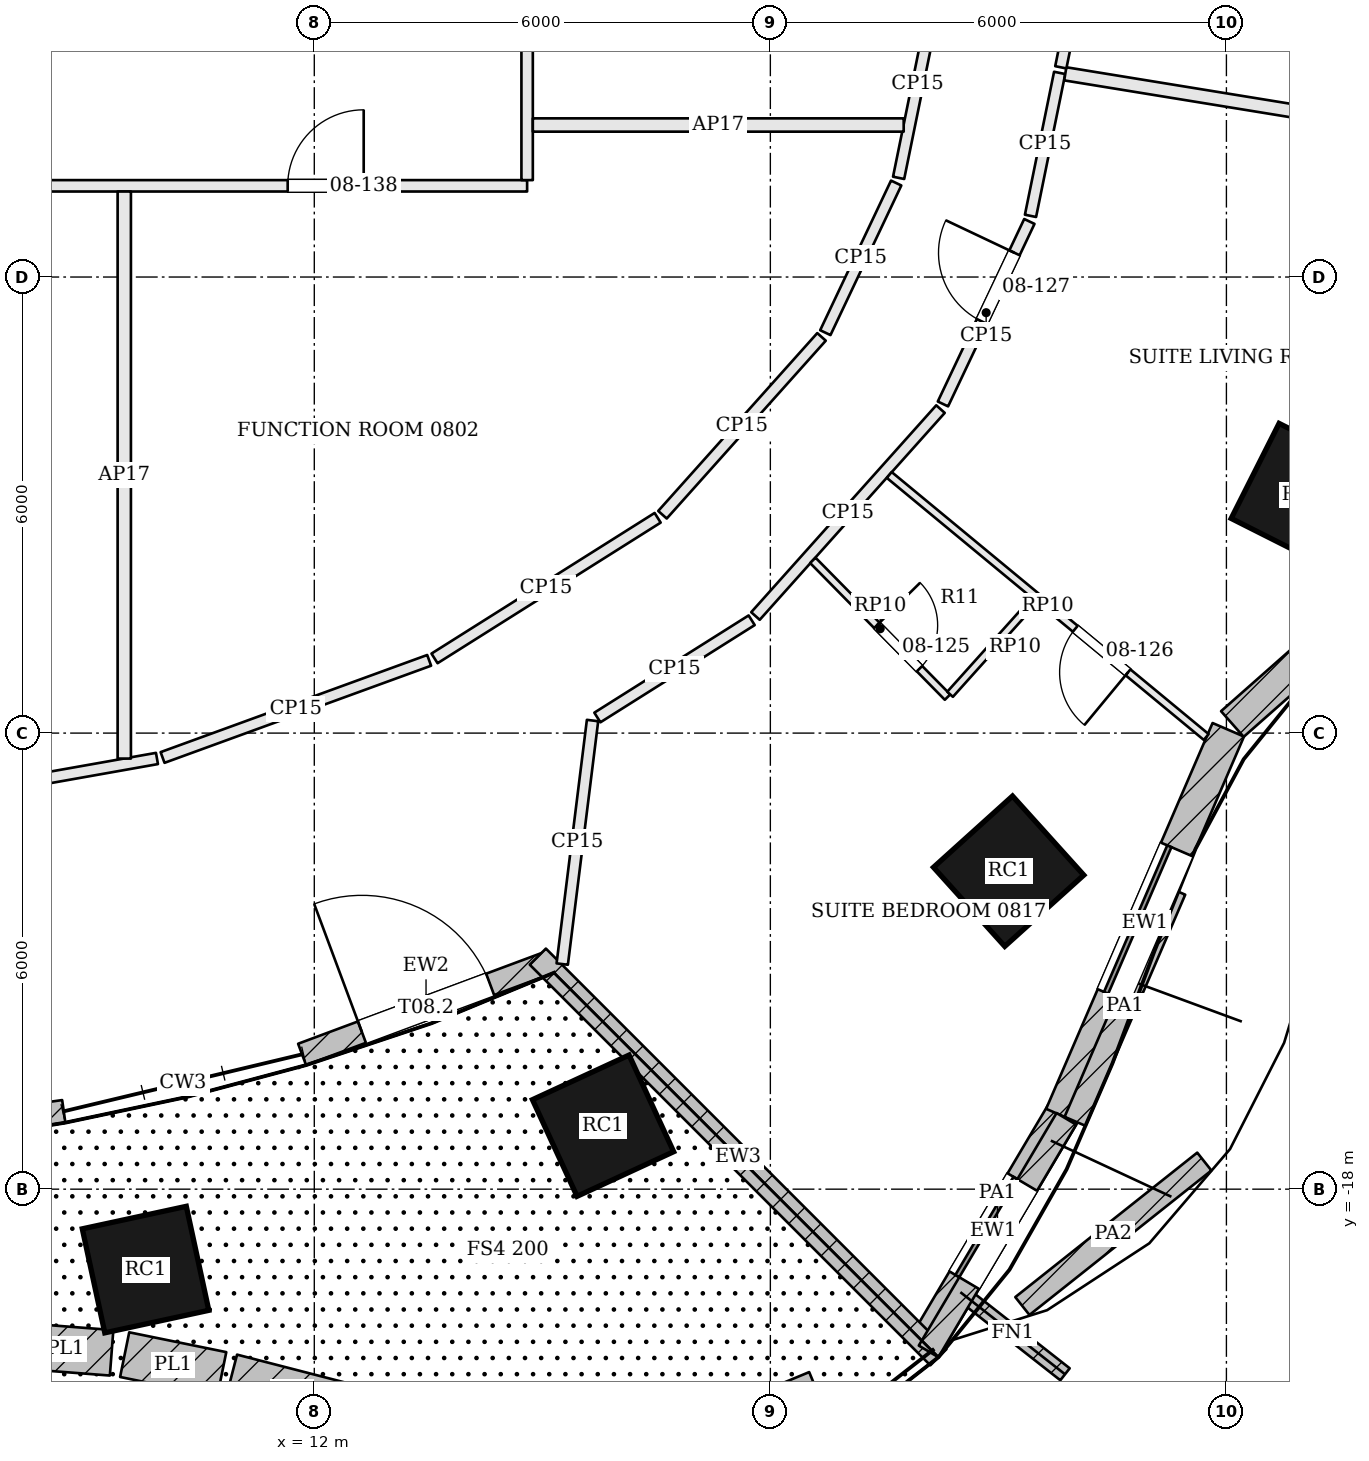
"""IFC4 building model, lengths in metres.
Left out: names, types, materials, properties, quantities, classifications, styles, units other than length and angle.
Written with IfcOpenShell. Run it as: python <this file> out.ifc"""

import sys

from ifc_helpers import new_model, si_unit, direction, frame, frame_2d, origin, origin_2d, place, context, subcontext, project, spatial, rectangle, extrude, element, fill, save


model = new_model("IFC4")
c1 = context("Model", 3, precision=1e-05, world=origin(), true_north=direction((0.0, 1.0)))
c2 = subcontext(c1, "Body", "Model", "MODEL_VIEW")
j1 = project(units=[si_unit("LENGTHUNIT", "METRE"), si_unit("PLANEANGLEUNIT", "RADIAN")], contexts=[c1])
p1 = place(None, origin())
s1 = spatial("IfcSite", under=j1, at=p1, CompositionType="ELEMENT")
p2 = place(p1, origin())
s2 = spatial("IfcBuilding", under=s1, at=p2, CompositionType="ELEMENT")
p3 = place(p2, frame((0.0, 0.0, 44.7)))
s3 = spatial("IfcBuildingStorey", under=s2, at=p3, CompositionType="ELEMENT", Elevation=44.7)
for number, where, z_axis, x_axis in (
    (1, (9.78, -19.058, 0.0), (0.0, 0.0, 1.0), (0.977, 0.211, 0.0)),
    (2, (15.799, -17.165, 0.0), (0.0, 0.0, 1.0), (0.908, 0.419, 0.0)),
    (3, (21.135, -13.817, 0.0), (0.0, 0.0, 1.0), (0.743, 0.67, 0.0)),
    (4, (25.003, -8.866, 0.0), (0.0, 0.0, 1.0), (0.45, 0.893, 0.0)),
):
    element("IfcColumn", number, at=place(p3, frame(where, z_axis=z_axis, x_axis=x_axis)), inside=s3, PredefinedType="COLUMN", context=c2, shape_type="SweptSolid", body=[
        extrude(rectangle(XDim=1.4, YDim=1.4, at=origin_2d()), origin(), (0.0, 0.0, 1.0), 3.6),
    ])
p4 = place(p3, frame((5.682, -17.405, 0.0), z_axis=(0.0, 0.0, 1.0), x_axis=(0.990121520331, 0.140211893137, 0.0)))
e5 = element("IfcWall", 5, at=p4, inside=s3, PredefinedType="SOLIDWALL", context=c2, shape_type="SweptSolid", body=[
    extrude(rectangle(XDim=3.052, YDim=0.3, at=frame_2d((1.526, 0.0))), origin(), (0.0, 0.0, 1.0), 2.7),
])
p5 = place(p4, frame((0.626, 0.0, 0.0)))
e6 = element("IfcOpeningElement", 6, at=p5, cuts=e5, PredefinedType="OPENING", context=c2, shape_type="SweptSolid", body=[
    extrude(rectangle(XDim=1.8, YDim=2.4, at=frame_2d((0.9, 1.2))), frame((0.0, 0.16, 0.0), z_axis=(0.0, -1.0, 0.0), x_axis=(1.0, 0.0, 0.0)), (0.0, 0.0, 1.0), 0.32),
])
p6 = place(p3, frame((11.84, -16.227, 0.0), z_axis=(0.0, 0.0, 1.0), x_axis=(0.937085264985, 0.349100567385, 0.0)))
e7 = element("IfcWall", 7, at=p6, inside=s3, PredefinedType="SOLIDWALL", context=c2, shape_type="SweptSolid", body=[
    extrude(rectangle(XDim=3.48, YDim=0.3, at=frame_2d((1.74, 0.0))), origin(), (0.0, 0.0, 1.0), 2.7),
])
p7 = place(p6, frame((0.84, 0.0, 0.0)))
e8 = element("IfcOpeningElement", 8, at=p7, cuts=e7, PredefinedType="OPENING", context=c2, shape_type="SweptSolid", body=[
    extrude(rectangle(XDim=1.8, YDim=2.4, at=frame_2d((0.9, 1.2))), frame((0.0, 0.16, 0.0), z_axis=(0.0, -1.0, 0.0), x_axis=(1.0, 0.0, 0.0)), (0.0, 0.0, 1.0), 0.32),
])
p8 = place(p3, frame((20.017, -20.096, 0.0), z_axis=(0.0, 0.0, 1.0), x_axis=(0.509718522454, 0.860341227576, 0.0)))
e9 = element("IfcWall", 9, at=p8, inside=s3, PredefinedType="SOLIDWALL", context=c2, shape_type="SweptSolid", body=[
    extrude(rectangle(XDim=3.591, YDim=0.45, at=frame_2d((1.795, 0.0))), origin(), (0.0, 0.0, 1.0), 3.4),
])
p9 = place(p8, frame((1.045, 0.0, 0.9)))
e10 = element("IfcOpeningElement", 10, at=p9, cuts=e9, PredefinedType="OPENING", context=c2, shape_type="SweptSolid", body=[
    extrude(rectangle(XDim=1.5, YDim=2.0, at=frame_2d((0.75, 1.0))), frame((0.0, 0.235, 0.0), z_axis=(0.0, -1.0, 0.0), x_axis=(1.0, 0.0, 0.0)), (0.0, 0.0, 1.0), 0.47),
])
p10 = place(p3, frame((21.835, -17.032, 0.0), z_axis=(0.0, 0.0, 1.0), x_axis=(0.396103523022, 0.918205858753, 0.0)))
e11 = element("IfcWall", 11, at=p10, inside=s3, PredefinedType="SOLIDWALL", context=c2, shape_type="SweptSolid", body=[
    extrude(rectangle(XDim=5.528, YDim=0.45, at=frame_2d((2.764, 0.0))), origin(), (0.0, 0.0, 1.0), 3.4),
])
p11 = place(p10, frame((1.714, 0.0, 0.9)))
e12 = element("IfcOpeningElement", 12, at=p11, cuts=e11, PredefinedType="OPENING", context=c2, shape_type="SweptSolid", body=[
    extrude(rectangle(XDim=2.1, YDim=2.0, at=frame_2d((1.05, 1.0))), frame((0.0, 0.235, 0.0), z_axis=(0.0, -1.0, 0.0), x_axis=(1.0, 0.0, 0.0)), (0.0, 0.0, 1.0), 0.47),
])
p12 = place(p3, frame((24.078, -11.88, 0.0), z_axis=(0.0, 0.0, 1.0), x_axis=(0.749778352475, 0.661689067583, 0.0)))
e13 = element("IfcWall", 13, at=p12, inside=s3, PredefinedType="SOLIDWALL", context=c2, shape_type="SweptSolid", body=[
    extrude(rectangle(XDim=4.67, YDim=0.45, at=frame_2d((2.335, 0.0))), origin(), (0.0, 0.0, 1.0), 3.4),
])
p13 = place(p12, frame((1.285, 0.0, 0.9)))
e14 = element("IfcOpeningElement", 14, at=p13, cuts=e13, PredefinedType="OPENING", context=c2, shape_type="SweptSolid", body=[
    extrude(rectangle(XDim=2.1, YDim=2.0, at=frame_2d((1.05, 1.0))), frame((0.0, 0.235, 0.0), z_axis=(0.0, -1.0, 0.0), x_axis=(1.0, 0.0, 0.0)), (0.0, 0.0, 1.0), 0.47),
])
p14 = place(p3, frame((20.5, -19.355, 0.0), z_axis=(0.0, 0.0, 1.0), x_axis=(0.786700632228, -0.617334686577, 0.0)))
e15 = element("IfcWall", 15, at=p14, inside=s3, PredefinedType="SOLIDWALL", context=c2, shape_type="SweptSolid", body=[
    extrude(rectangle(XDim=1.75, YDim=0.2, at=frame_2d((0.875, 0.0))), origin(), (0.0, 0.0, 1.0), 3.4),
])
p15 = place(p3, frame((20.211, -20.211, 0.0), z_axis=(0.0, 0.0, 1.0), x_axis=(-0.707106781187, 0.707106781187, 0.0)))
e16 = element("IfcWall", 16, at=p15, inside=s3, PredefinedType="SOLIDWALL", context=c2, shape_type="SweptSolid", body=[
    extrude(rectangle(XDim=7.453, YDim=0.3, at=frame_2d((3.727, 0.0))), origin(), (0.0, 0.0, 1.0), 2.954),
])
p16 = place(p3, frame((8.118, -20.06, 0.0), z_axis=(0.0, 0.0, 1.0), x_axis=(0.997068607032, -0.076512697446, 0.0)))
e17 = element("IfcWall", 17, at=p16, inside=s3, PredefinedType="SOLIDWALL", context=c2, shape_type="SweptSolid", body=[
    extrude(rectangle(XDim=1.219, YDim=0.6, at=frame_2d((0.609, 0.0))), origin(), (0.0, 0.0, 1.0), 0.6),
])
p17 = place(p3, frame((9.505, -20.177, 0.0), z_axis=(0.0, 0.0, 1.0), x_axis=(0.979743342567, -0.200257291244, 0.0)))
e18 = element("IfcWall", 18, at=p17, inside=s3, PredefinedType="SOLIDWALL", context=c2, shape_type="SweptSolid", body=[
    extrude(rectangle(XDim=1.303, YDim=0.6, at=frame_2d((0.652, 0.0))), origin(), (0.0, 0.0, 1.0), 0.6),
])
p18 = place(p3, frame((10.909, -20.467, 0.0), z_axis=(0.0, 0.0, 1.0), x_axis=(0.968308440861, -0.249757409014, 0.0)))
e19 = element("IfcWall", 19, at=p18, inside=s3, PredefinedType="SOLIDWALL", context=c2, shape_type="SweptSolid", body=[
    extrude(rectangle(XDim=1.653, YDim=0.6, at=frame_2d((0.827, 0.0))), origin(), (0.0, 0.0, 1.0), 0.6),
])
p19 = place(p3, frame((17.43, -21.179, 0.0), z_axis=(0.0, 0.0, 1.0), x_axis=(0.923745369832, 0.383007169273, 0.0)))
e20 = element("IfcWall", 20, at=p19, inside=s3, PredefinedType="SOLIDWALL", context=c2, shape_type="SweptSolid", body=[
    extrude(rectangle(XDim=1.294, YDim=0.6, at=frame_2d((0.647, 0.0))), origin(), (0.0, 0.0, 1.0), 0.6),
])
p20 = place(p3, frame((23.709, -17.637, 0.0), z_axis=(0.0, 0.0, 1.0), x_axis=(-0.783162328439, -0.62181731024, 0.0)))
e21 = element("IfcWall", 21, at=p20, inside=s3, PredefinedType="PARAPET", context=c2, shape_type="SweptSolid", body=[
    extrude(rectangle(XDim=3.057, YDim=0.3, at=frame_2d((1.528, 0.0))), origin(), (0.0, 0.0, 1.0), 1.1),
])
p21 = place(p3, frame((20.082, -20.135, 3.6), z_axis=(0.0, 0.0, 1.0), x_axis=(0.50970265733, 0.860350626844, 0.0)))
e22 = element("IfcWall", 22, at=p21, inside=s3, PredefinedType="PARAPET", context=c2, shape_type="SweptSolid", body=[
    extrude(rectangle(XDim=3.556, YDim=0.3, at=frame_2d((1.778, 0.0))), origin(), (0.0, 0.0, 1.0), 1.1),
])
p22 = place(p3, frame((22.009, -17.107, 3.6), z_axis=(0.0, 0.0, 1.0), x_axis=(0.396142292889, 0.918189132905, 0.0)))
e23 = element("IfcWall", 23, at=p22, inside=s3, PredefinedType="PARAPET", context=c2, shape_type="SweptSolid", body=[
    extrude(rectangle(XDim=3.312, YDim=0.3, at=frame_2d((1.656, 0.0))), origin(), (0.0, 0.0, 1.0), 1.1),
])
p23 = place(p3, frame((15.262, -15.039, 0.0), z_axis=(0.0, 0.0, 1.0), x_axis=(0.123485606302, 0.992346363442, 0.0)))
e24 = element("IfcWall", 24, at=p23, inside=s3, PredefinedType="PARTITIONING", context=c2, shape_type="SweptSolid", body=[
    extrude(rectangle(XDim=3.229, YDim=0.15, at=frame_2d((1.614, 0.0))), origin(), (0.0, 0.0, 1.0), 2.68),
])
p24 = place(p3, frame((15.724, -11.795, 0.0), z_axis=(0.0, 0.0, 1.0), x_axis=(0.846020384979, 0.533150549283, 0.0)))
e25 = element("IfcWall", 25, at=p24, inside=s3, PredefinedType="PARTITIONING", context=c2, shape_type="SweptSolid", body=[
    extrude(rectangle(XDim=2.399, YDim=0.15, at=frame_2d((1.2, 0.0))), origin(), (0.0, 0.0, 1.0), 2.68),
])
p25 = place(p3, frame((17.804, -10.46, 0.0), z_axis=(0.0, 0.0, 1.0), x_axis=(0.666597463623, 0.745417883802, 0.0)))
e26 = element("IfcWall", 26, at=p25, inside=s3, PredefinedType="PARTITIONING", context=c2, shape_type="SweptSolid", body=[
    extrude(rectangle(XDim=3.652, YDim=0.15, at=frame_2d((1.826, 0.0))), origin(), (0.0, 0.0, 1.0), 2.68),
])
p26 = place(p3, frame((20.271, -7.67, 0.0), z_axis=(0.0, 0.0, 1.0), x_axis=(0.427995478521, 0.903780875193, 0.0)))
e27 = element("IfcWall", 27, at=p26, inside=s3, PredefinedType="PARTITIONING", context=c2, shape_type="SweptSolid", body=[
    extrude(rectangle(XDim=2.656, YDim=0.15, at=frame_2d((1.328, 0.0))), origin(), (0.0, 0.0, 1.0), 2.68),
])
p27 = place(p26, frame((1.2, 0.0, 0.0)))
e28 = element("IfcOpeningElement", 28, at=p27, cuts=e27, PredefinedType="OPENING", context=c2, shape_type="SweptSolid", body=[
    extrude(rectangle(XDim=1.0, YDim=2.1, at=frame_2d((0.5, 1.05))), frame((0.0, 0.085, 0.0), z_axis=(0.0, -1.0, 0.0), x_axis=(1.0, 0.0, 0.0)), (0.0, 0.0, 1.0), 0.17),
])
p28 = place(p3, frame((21.423, -5.195, 0.0), z_axis=(0.0, 0.0, 1.0), x_axis=(0.199808007721, 0.97983506778, 0.0)))
e29 = element("IfcWall", 29, at=p28, inside=s3, PredefinedType="PARTITIONING", context=c2, shape_type="SweptSolid", body=[
    extrude(rectangle(XDim=1.92, YDim=0.15, at=frame_2d((0.96, 0.0))), origin(), (0.0, 0.0, 1.0), 2.68),
])
p29 = place(p3, frame((30.803, -4.78, 0.0), z_axis=(0.0, 0.0, 1.0), x_axis=(-0.98698803995, 0.160793684567, 0.0)))
e30 = element("IfcWall", 30, at=p29, inside=s3, PredefinedType="PARTITIONING", context=c2, shape_type="SweptSolid", body=[
    extrude(rectangle(XDim=9.04, YDim=0.175, at=frame_2d((4.52, 0.0))), origin(), (0.0, 0.0, 1.0), 2.68),
])
p30 = place(p3, frame((21.821, -3.241, 0.0), z_axis=(0.0, 0.0, 1.0), x_axis=(0.199859337249, 0.97982459926, 0.0)))
e31 = element("IfcWall", 31, at=p30, inside=s3, PredefinedType="PARTITIONING", context=c2, shape_type="SweptSolid", body=[
    extrude(rectangle(XDim=0.903, YDim=0.15, at=frame_2d((0.451, 0.0))), origin(), (0.0, 0.0, 1.0), 2.68),
])
p31 = place(p3, frame((20.19, -2.229, 0.0), z_axis=(0.0, 0.0, 1.0), x_axis=(-0.199752828647, -0.97984631828, 0.0)))
e32 = element("IfcWall", 32, at=p31, inside=s3, PredefinedType="PARTITIONING", context=c2, shape_type="SweptSolid", body=[
    extrude(rectangle(XDim=2.517, YDim=0.15, at=frame_2d((1.258, 0.0))), origin(), (0.0, 0.0, 1.0), 2.68),
])
p32 = place(p3, frame((19.655, -4.763, 0.0), z_axis=(0.0, 0.0, 1.0), x_axis=(-0.427965880464, -0.903794891089, 0.0)))
e33 = element("IfcWall", 33, at=p32, inside=s3, PredefinedType="PARTITIONING", context=c2, shape_type="SweptSolid", body=[
    extrude(rectangle(XDim=2.178, YDim=0.15, at=frame_2d((1.089, 0.0))), origin(), (0.0, 0.0, 1.0), 2.68),
])
p33 = place(p3, frame((18.673, -6.788, 0.0), z_axis=(0.0, 0.0, 1.0), x_axis=(-0.666610670036, -0.745406073623, 0.0)))
e34 = element("IfcWall", 34, at=p33, inside=s3, PredefinedType="PARTITIONING", context=c2, shape_type="SweptSolid", body=[
    extrude(rectangle(XDim=3.139, YDim=0.15, at=frame_2d((1.569, 0.0))), origin(), (0.0, 0.0, 1.0), 2.68),
])
p34 = place(p3, frame((16.517, -9.167, 0.0), z_axis=(0.0, 0.0, 1.0), x_axis=(-0.846000117603, -0.533182708849, 0.0)))
e35 = element("IfcWall", 35, at=p34, inside=s3, PredefinedType="PARTITIONING", context=c2, shape_type="SweptSolid", body=[
    extrude(rectangle(XDim=3.47, YDim=0.15, at=frame_2d((1.735, 0.0))), origin(), (0.0, 0.0, 1.0), 2.68),
])
p35 = place(p3, frame((13.511, -11.043, 0.0), z_axis=(0.0, 0.0, 1.0), x_axis=(-0.939583191704, -0.342320647736, 0.0)))
e36 = element("IfcWall", 36, at=p35, inside=s3, PredefinedType="PARTITIONING", context=c2, shape_type="SweptSolid", body=[
    extrude(rectangle(XDim=3.733, YDim=0.15, at=frame_2d((1.866, 0.0))), origin(), (0.0, 0.0, 1.0), 2.68),
])
p36 = place(p3, frame((9.93, -12.334, 0.0), z_axis=(0.0, 0.0, 1.0), x_axis=(-0.984638212434, -0.174606960386, 0.0)))
e37 = element("IfcWall", 37, at=p36, inside=s3, PredefinedType="PARTITIONING", context=c2, shape_type="SweptSolid", body=[
    extrude(rectangle(XDim=4.848, YDim=0.15, at=frame_2d((2.424, 0.0))), origin(), (0.0, 0.0, 1.0), 2.68),
])
p37 = place(p3, frame((-14.725, -4.8, 0.0), z_axis=(0.0, 0.0, 1.0), x_axis=(1.0, 0.0, 0.0)))
e38 = element("IfcWall", 38, at=p37, inside=s3, PredefinedType="PARTITIONING", context=c2, shape_type="SweptSolid", body=[
    extrude(rectangle(XDim=29.525, YDim=0.15, at=frame_2d((14.763, 0.0))), origin(), (0.0, 0.0, 1.0), 2.68),
])
p38 = place(p37, frame((2.075, 0.0, 0.0)))
e39 = element("IfcOpeningElement", 39, at=p38, cuts=e38, PredefinedType="OPENING", context=c2, shape_type="SweptSolid", body=[
    extrude(rectangle(XDim=1.0, YDim=2.4, at=frame_2d((0.5, 1.2))), frame((0.0, 0.085, 0.0), z_axis=(0.0, -1.0, 0.0), x_axis=(1.0, 0.0, 0.0)), (0.0, 0.0, 1.0), 0.17),
])
p39 = place(p37, frame((13.825, 0.0, 0.0)))
e40 = element("IfcOpeningElement", 40, at=p39, cuts=e38, PredefinedType="OPENING", context=c2, shape_type="SweptSolid", body=[
    extrude(rectangle(XDim=1.8, YDim=2.1, at=frame_2d((0.9, 1.05))), frame((0.0, 0.085, 0.0), z_axis=(0.0, -1.0, 0.0), x_axis=(1.0, 0.0, 0.0)), (0.0, 0.0, 1.0), 0.17),
])
p40 = place(p37, frame((26.375, 0.0, 0.0)))
e41 = element("IfcOpeningElement", 41, at=p40, cuts=e38, PredefinedType="OPENING", context=c2, shape_type="SweptSolid", body=[
    extrude(rectangle(XDim=1.0, YDim=2.4, at=frame_2d((0.5, 1.2))), frame((0.0, 0.085, 0.0), z_axis=(0.0, -1.0, 0.0), x_axis=(1.0, 0.0, 0.0)), (0.0, 0.0, 1.0), 0.17),
])
p41 = place(p3, frame((14.8, -4.725, 0.0), z_axis=(0.0, 0.0, 1.0), x_axis=(0.0, 1.0, 0.0)))
e42 = element("IfcWall", 42, at=p41, inside=s3, PredefinedType="PARTITIONING", context=c2, shape_type="SweptSolid", body=[
    extrude(rectangle(XDim=15.008, YDim=0.15, at=frame_2d((7.504, 0.0))), origin(), (0.0, 0.0, 1.0), 2.68),
])
p42 = place(p41, frame((11.516, 0.0, 0.0)))
e43 = element("IfcOpeningElement", 43, at=p42, cuts=e42, PredefinedType="OPENING", context=c2, shape_type="SweptSolid", body=[
    extrude(rectangle(XDim=0.7, YDim=2.1, at=frame_2d((0.35, 1.05))), frame((0.0, 0.085, 0.0), z_axis=(0.0, -1.0, 0.0), x_axis=(1.0, 0.0, 0.0)), (0.0, 0.0, 1.0), 0.17),
])
p43 = place(p41, frame((4.225, 0.0, 0.0)))
e44 = element("IfcOpeningElement", 44, at=p43, cuts=e42, PredefinedType="OPENING", context=c2, shape_type="SweptSolid", body=[
    extrude(rectangle(XDim=1.0, YDim=2.1, at=frame_2d((0.5, 1.05))), frame((0.0, 0.085, 0.0), z_axis=(0.0, -1.0, 0.0), x_axis=(1.0, 0.0, 0.0)), (0.0, 0.0, 1.0), 0.17),
])
p44 = place(p3, frame((23.734, -12.051, 0.0), z_axis=(0.0, 0.0, 1.0), x_axis=(-0.77073049993, 0.637161279801, 0.0)))
e45 = element("IfcWall", 45, at=p44, inside=s3, PredefinedType="PARTITIONING", context=c2, shape_type="SweptSolid", body=[
    extrude(rectangle(XDim=5.41, YDim=0.1, at=frame_2d((2.705, 0.0))), origin(), (0.0, 0.0, 1.0), 2.68),
])
p45 = place(p44, frame((1.335, 0.0, 0.0)))
e46 = element("IfcOpeningElement", 46, at=p45, cuts=e45, PredefinedType="OPENING", context=c2, shape_type="SweptSolid", body=[
    extrude(rectangle(XDim=0.9, YDim=2.4, at=frame_2d((0.45, 1.2))), frame((0.0, 0.06, 0.0), z_axis=(0.0, -1.0, 0.0), x_axis=(1.0, 0.0, 0.0)), (0.0, 0.0, 1.0), 0.12),
])
p46 = place(p3, frame((18.559, -9.728, 0.0), z_axis=(0.0, 0.0, 1.0), x_axis=(0.701671470807, -0.712500629513, 0.0)))
e47 = element("IfcWall", 47, at=p46, inside=s3, PredefinedType="PARTITIONING", context=c2, shape_type="SweptSolid", body=[
    extrude(rectangle(XDim=2.525, YDim=0.1, at=frame_2d((1.262, 0.0))), origin(), (0.0, 0.0, 1.0), 2.68),
])
p47 = place(p46, frame((1.2, 0.0, 0.0)))
e48 = element("IfcOpeningElement", 48, at=p47, cuts=e47, PredefinedType="OPENING", context=c2, shape_type="SweptSolid", body=[
    extrude(rectangle(XDim=0.8, YDim=2.1, at=frame_2d((0.4, 1.05))), frame((0.0, 0.06, 0.0), z_axis=(0.0, -1.0, 0.0), x_axis=(1.0, 0.0, 0.0)), (0.0, 0.0, 1.0), 0.12),
])
p48 = place(p3, frame((20.364, -11.49, 0.0), z_axis=(0.0, 0.0, 1.0), x_axis=(0.667968030359, 0.744189969307, 0.0)))
e49 = element("IfcWall", 49, at=p48, inside=s3, PredefinedType="PARTITIONING", context=c2, shape_type="SweptSolid", body=[
    extrude(rectangle(XDim=1.666, YDim=0.1, at=frame_2d((0.833, 0.0))), origin(), (0.0, 0.0, 1.0), 2.68),
])
p49 = place(p3, frame((9.5, -12.335, 0.0), z_axis=(0.0, 0.0, 1.0), x_axis=(0.0, 1.0, 0.0)))
e50 = element("IfcWall", 50, at=p49, inside=s3, PredefinedType="PARTITIONING", context=c2, shape_type="SweptSolid", body=[
    extrude(rectangle(XDim=7.46, YDim=0.175, at=frame_2d((3.73, 0.0))), origin(), (0.0, 0.0, 1.0), 2.68),
])
p50 = place(p3, frame((14.875, -4.0, 0.0), z_axis=(0.0, 0.0, 1.0), x_axis=(1.0, 0.0, 0.0)))
e51 = element("IfcWall", 51, at=p50, inside=s3, PredefinedType="PARTITIONING", context=c2, shape_type="SweptSolid", body=[
    extrude(rectangle(XDim=4.879, YDim=0.175, at=frame_2d((2.439, 0.0))), origin(), (0.0, 0.0, 1.0), 2.68),
])
p51 = place(p7, origin())
e52 = element("IfcDoor", 52, at=p51, inside=s3, OperationType="DOUBLE_DOOR_DOUBLE_SWING", PredefinedType="DOOR", context=c2, shape_type="SweptSolid", body=[
    extrude(rectangle(XDim=1.8, YDim=2.4, at=frame_2d((0.9, 1.2))), frame((0.0, 0.025, 0.0), z_axis=(0.0, -1.0, 0.0), x_axis=(1.0, 0.0, 0.0)), (0.0, 0.0, 1.0), 0.05),
])
fill(e8, e52)
p52 = place(p9, origin())
e53 = element("IfcWindow", 53, at=p52, inside=s3, PartitioningType="SINGLE_PANEL", PredefinedType="WINDOW", context=c2, shape_type="SweptSolid", body=[
    extrude(rectangle(XDim=1.5, YDim=2.0, at=frame_2d((0.75, 1.0))), frame((0.0, 0.135, 0.0), z_axis=(0.0, -1.0, 0.0), x_axis=(1.0, 0.0, 0.0)), (0.0, 0.0, 1.0), 0.06),
])
fill(e10, e53)
p53 = place(p11, origin())
e54 = element("IfcWindow", 54, at=p53, inside=s3, PartitioningType="SINGLE_PANEL", PredefinedType="WINDOW", context=c2, shape_type="SweptSolid", body=[
    extrude(rectangle(XDim=2.1, YDim=2.0, at=frame_2d((1.05, 1.0))), frame((0.0, 0.135, 0.0), z_axis=(0.0, -1.0, 0.0), x_axis=(1.0, 0.0, 0.0)), (0.0, 0.0, 1.0), 0.06),
])
fill(e12, e54)
p54 = place(p47, origin())
e55 = element("IfcDoor", 55, at=p54, inside=s3, OperationType="SINGLE_SWING_LEFT", PredefinedType="DOOR", context=c2, shape_type="SweptSolid", body=[
    extrude(rectangle(XDim=0.8, YDim=2.1, at=frame_2d((0.4, 1.05))), frame((0.0, 0.025, 0.0), z_axis=(0.0, -1.0, 0.0), x_axis=(1.0, 0.0, 0.0)), (0.0, 0.0, 1.0), 0.05),
])
fill(e48, e55)
p55 = place(p45, origin())
e56 = element("IfcDoor", 56, at=p55, inside=s3, OperationType="SINGLE_SWING_LEFT", PredefinedType="DOOR", context=c2, shape_type="SweptSolid", body=[
    extrude(rectangle(XDim=0.9, YDim=2.4, at=frame_2d((0.45, 1.2))), frame((0.0, 0.025, 0.0), z_axis=(0.0, -1.0, 0.0), x_axis=(1.0, 0.0, 0.0)), (0.0, 0.0, 1.0), 0.05),
])
fill(e46, e56)
p56 = place(p27, origin())
e57 = element("IfcDoor", 57, at=p56, inside=s3, OperationType="SINGLE_SWING_RIGHT", PredefinedType="DOOR", context=c2, shape_type="SweptSolid", body=[
    extrude(rectangle(XDim=1.0, YDim=2.1, at=frame_2d((0.5, 1.05))), frame((0.0, 0.025, 0.0), z_axis=(0.0, -1.0, 0.0), x_axis=(1.0, 0.0, 0.0)), (0.0, 0.0, 1.0), 0.05),
])
fill(e28, e57)
p57 = place(p40, origin())
e58 = element("IfcDoor", 58, at=p57, inside=s3, OperationType="SINGLE_SWING_RIGHT", PredefinedType="DOOR", context=c2, shape_type="SweptSolid", body=[
    extrude(rectangle(XDim=1.0, YDim=2.4, at=frame_2d((0.5, 1.2))), frame((0.0, 0.025, 0.0), z_axis=(0.0, -1.0, 0.0), x_axis=(1.0, 0.0, 0.0)), (0.0, 0.0, 1.0), 0.05),
])
fill(e41, e58)
save(model, sys.argv[1])
